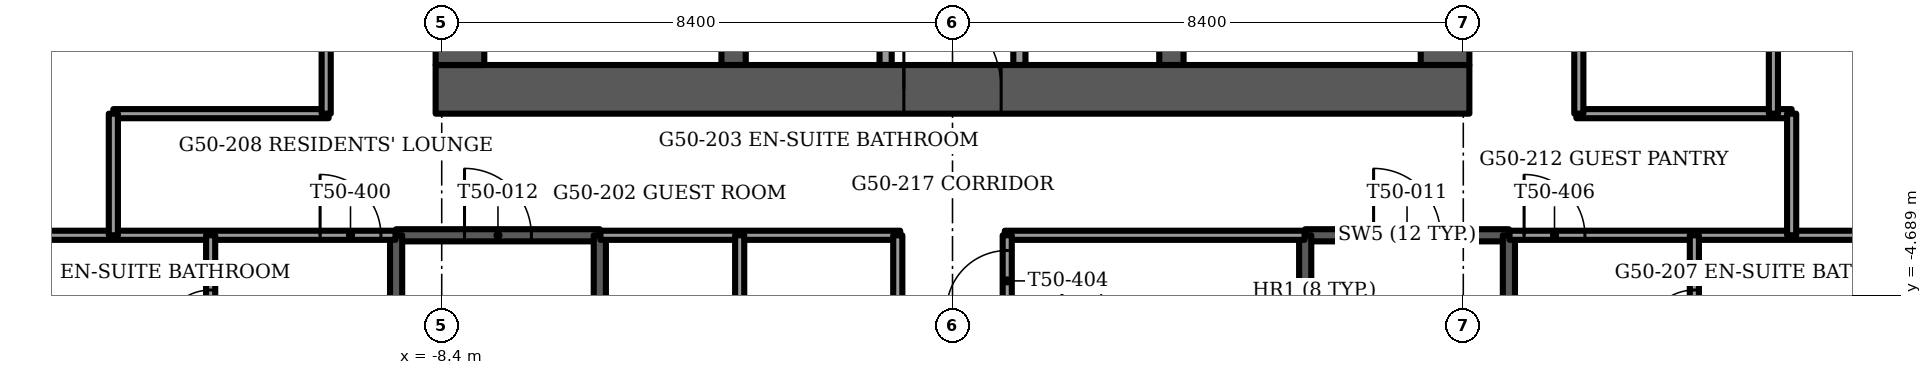
"""IFC4 building model, lengths in metres.
Left out: names, types, materials, properties, quantities, classifications, styles, units other than length and angle.
Written with IfcOpenShell. Run it as: python <this file> out.ifc"""

import sys

from ifc_helpers import new_model, si_unit, direction, frame, frame_2d, origin, place, context, subcontext, project, spatial, rectangle, extrude, element, fill, save


model = new_model("IFC4")
c1 = context("Model", 3, precision=1e-05, world=origin(), true_north=direction((0.0, 1.0)))
c2 = subcontext(c1, "Body", "Model", "MODEL_VIEW")
j1 = project(units=[si_unit("LENGTHUNIT", "METRE"), si_unit("PLANEANGLEUNIT", "RADIAN")], contexts=[c1])
p1 = place(None, origin())
s1 = spatial("IfcSite", under=j1, at=p1, CompositionType="ELEMENT")
p2 = place(p1, origin())
s2 = spatial("IfcBuilding", under=s1, at=p2, CompositionType="ELEMENT")
p3 = place(p2, frame((0.0, 0.0, 202.0)))
s3 = spatial("IfcBuildingStorey", under=s2, at=p3, CompositionType="ELEMENT", Elevation=202.0)
p4 = place(p3, frame((-8.5, -1.3, -0.3), z_axis=(0.0, 0.0, 1.0), x_axis=(1.0, 0.0, 0.0)))
e1 = element("IfcWall", 1, at=p4, inside=s3, PredefinedType="SHEAR", context=c2, shape_type="SweptSolid", body=[
    extrude(rectangle(XDim=17.0, YDim=0.8, at=frame_2d((8.5, 0.0))), origin(), (0.0, 0.0, 1.0), 3.75),
])
p5 = place(p4, frame((7.7, 0.0, 0.0)))
e2 = element("IfcOpeningElement", 2, at=p5, cuts=e1, PredefinedType="OPENING", context=c2, shape_type="SweptSolid", body=[
    extrude(rectangle(XDim=1.6, YDim=2.1, at=frame_2d((0.8, 1.05))), frame((0.0, 0.4, 0.0), z_axis=(0.0, -1.0, 0.0), x_axis=(1.0, 0.0, 0.0)), (0.0, 0.0, 1.0), 0.8),
])
p6 = place(p3, frame((-8.1, -0.9, -0.3), z_axis=(0.0, 0.0, 1.0), x_axis=(0.0, 1.0, 0.0)))
e3 = element("IfcWall", 3, at=p6, inside=s3, PredefinedType="SHEAR", context=c2, shape_type="SweptSolid", body=[
    extrude(rectangle(XDim=9.8, YDim=0.8, at=frame_2d((4.9, 0.0))), origin(), (0.0, 0.0, 1.0), 3.75),
])
p7 = place(p6, frame((8.15, 0.0, 0.0)))
e4 = element("IfcOpeningElement", 4, at=p7, cuts=e3, PredefinedType="OPENING", context=c2, shape_type="SweptSolid", body=[
    extrude(rectangle(XDim=1.1, YDim=2.1, at=frame_2d((0.55, 1.05))), frame((0.0, 0.4, 0.0), z_axis=(0.0, -1.0, 0.0), x_axis=(1.0, 0.0, 0.0)), (0.0, 0.0, 1.0), 0.8),
])
p8 = place(p3, frame((8.1, -0.9, -0.3), z_axis=(0.0, 0.0, 1.0), x_axis=(0.0, 1.0, 0.0)))
e5 = element("IfcWall", 5, at=p8, inside=s3, PredefinedType="SHEAR", context=c2, shape_type="SweptSolid", body=[
    extrude(rectangle(XDim=9.8, YDim=0.8, at=frame_2d((4.9, 0.0))), origin(), (0.0, 0.0, 1.0), 3.75),
])
p9 = place(p8, frame((8.15, 0.0, 0.0)))
e6 = element("IfcOpeningElement", 6, at=p9, cuts=e5, PredefinedType="OPENING", context=c2, shape_type="SweptSolid", body=[
    extrude(rectangle(XDim=1.1, YDim=2.1, at=frame_2d((0.55, 1.05))), frame((0.0, 0.4, 0.0), z_axis=(0.0, -1.0, 0.0), x_axis=(1.0, 0.0, 0.0)), (0.0, 0.0, 1.0), 0.8),
])
for number, where, z_axis, x_axis in (
    (7, (-3.6, -0.9, -0.3), (0.0, 0.0, 1.0), (0.0, 1.0, 0.0)),
    (8, (3.6, -0.9, -0.3), (0.0, 0.0, 1.0), (0.0, 1.0, 0.0)),
):
    element("IfcWall", number, at=place(p3, frame(where, z_axis=z_axis, x_axis=x_axis)), inside=s3, PredefinedType="SHEAR", context=c2, shape_type="SweptSolid", body=[
        extrude(rectangle(XDim=9.8, YDim=0.4, at=frame_2d((4.9, 0.0))), origin(), (0.0, 0.0, 1.0), 3.75),
    ])
p10 = place(p3, frame((-16.861, -1.645, 0.0), z_axis=(0.0, 0.0, 1.0), x_axis=(0.499993749393, -0.866029012544, 0.0)))
e9 = element("IfcWall", 9, at=p10, inside=s3, PredefinedType="SOLIDWALL", context=c2, shape_type="SweptSolid", body=[
    extrude(rectangle(XDim=10.075, YDim=0.15, at=frame_2d((5.038, 0.0))), origin(), (0.0, 0.0, 1.0), 3.45),
])
p11 = place(p10, frame((1.006, 0.0, 0.15)))
e10 = element("IfcOpeningElement", 10, at=p11, cuts=e9, PredefinedType="OPENING", context=c2, shape_type="SweptSolid", body=[
    extrude(rectangle(XDim=0.9, YDim=2.2, at=frame_2d((0.45, 1.1))), frame((0.0, 0.075, 0.0), z_axis=(0.0, -1.0, 0.0), x_axis=(1.0, 0.0, 0.0)), (0.0, 0.0, 1.0), 0.15),
])
p12 = place(p10, frame((3.206, 0.0, 0.15)))
e11 = element("IfcOpeningElement", 11, at=p12, cuts=e9, PredefinedType="OPENING", context=c2, shape_type="SweptSolid", body=[
    extrude(rectangle(XDim=1.4, YDim=2.2, at=frame_2d((0.7, 1.1))), frame((0.0, 0.075, 0.0), z_axis=(0.0, -1.0, 0.0), x_axis=(1.0, 0.0, 0.0)), (0.0, 0.0, 1.0), 0.15),
])
p13 = place(p10, frame((5.699, 0.0, 0.15)))
e12 = element("IfcOpeningElement", 12, at=p13, cuts=e9, PredefinedType="OPENING", context=c2, shape_type="SweptSolid", body=[
    extrude(rectangle(XDim=1.6, YDim=2.2, at=frame_2d((0.8, 1.1))), frame((0.0, 0.075, 0.0), z_axis=(0.0, -1.0, 0.0), x_axis=(1.0, 0.0, 0.0)), (0.0, 0.0, 1.0), 0.15),
])
p14 = place(p3, frame((11.824, -10.37, 0.0), z_axis=(0.0, 0.0, 1.0), x_axis=(0.499993749393, 0.866029012544, 0.0)))
e13 = element("IfcWall", 13, at=p14, inside=s3, PredefinedType="SOLIDWALL", context=c2, shape_type="SweptSolid", body=[
    extrude(rectangle(XDim=10.075, YDim=0.15, at=frame_2d((5.038, 0.0))), origin(), (0.0, 0.0, 1.0), 3.45),
])
p15 = place(p14, frame((1.269, 0.0, 0.15)))
e14 = element("IfcOpeningElement", 14, at=p15, cuts=e13, PredefinedType="OPENING", context=c2, shape_type="SweptSolid", body=[
    extrude(rectangle(XDim=1.6, YDim=2.2, at=frame_2d((0.8, 1.1))), frame((0.0, 0.075, 0.0), z_axis=(0.0, -1.0, 0.0), x_axis=(1.0, 0.0, 0.0)), (0.0, 0.0, 1.0), 0.15),
])
p16 = place(p14, frame((5.469, 0.0, 0.15)))
e15 = element("IfcOpeningElement", 15, at=p16, cuts=e13, PredefinedType="OPENING", context=c2, shape_type="SweptSolid", body=[
    extrude(rectangle(XDim=1.6, YDim=2.2, at=frame_2d((0.8, 1.1))), frame((0.0, 0.075, 0.0), z_axis=(0.0, -1.0, 0.0), x_axis=(1.0, 0.0, 0.0)), (0.0, 0.0, 1.0), 0.15),
])
for number, where, z_axis, x_axis in (
    (16, (-1.1, -0.9, 0.0), (0.0, 0.0, 1.0), (0.0, 1.0, 0.0)),
    (17, (1.1, -0.9, 0.0), (0.0, 0.0, 1.0), (0.0, 1.0, 0.0)),
):
    element("IfcWall", number, at=place(p3, frame(where, z_axis=z_axis, x_axis=x_axis)), inside=s3, PredefinedType="PARTITIONING", context=c2, shape_type="SweptSolid", body=[
        extrude(rectangle(XDim=2.9, YDim=0.2, at=frame_2d((1.45, 0.0))), origin(), (0.0, 0.0, 1.0), 3.45),
    ])
p17 = place(p3, frame((5.8, -3.7, -0.3), z_axis=(0.0, 0.0, 1.0), x_axis=(1.0, 0.0, 0.0)))
e18 = element("IfcWall", 18, at=p17, inside=s3, PredefinedType="SOLIDWALL", context=c2, shape_type="SweptSolid", body=[
    extrude(rectangle(XDim=3.35, YDim=0.2, at=frame_2d((1.675, 0.0))), origin(), (0.0, 0.0, 1.0), 3.75),
])
p18 = place(p17, frame((1.125, 0.0, 0.0)))
e19 = element("IfcOpeningElement", 19, at=p18, cuts=e18, PredefinedType="OPENING", context=c2, shape_type="SweptSolid", body=[
    extrude(rectangle(XDim=1.1, YDim=2.1, at=frame_2d((0.55, 1.05))), frame((0.0, 0.1, 0.0), z_axis=(0.0, -1.0, 0.0), x_axis=(1.0, 0.0, 0.0)), (0.0, 0.0, 1.0), 0.2),
])
for number, where, z_axis, x_axis in (
    (20, (5.8, -3.7, -0.3), (0.0, 0.0, 1.0), (0.0, -1.0, 0.0)),
    (21, (9.15, -3.7, -0.3), (0.0, 0.0, 1.0), (0.0, -1.0, 0.0)),
):
    element("IfcWall", number, at=place(p3, frame(where, z_axis=z_axis, x_axis=x_axis)), inside=s3, PredefinedType="SOLIDWALL", context=c2, shape_type="SweptSolid", body=[
        extrude(rectangle(XDim=7.7, YDim=0.2, at=frame_2d((3.85, 0.0))), origin(), (0.0, 0.0, 1.0), 3.75),
    ])
p19 = place(p3, frame((-9.15, -3.7, -0.3), z_axis=(0.0, 0.0, 1.0), x_axis=(1.0, 0.0, 0.0)))
e22 = element("IfcWall", 22, at=p19, inside=s3, PredefinedType="SOLIDWALL", context=c2, shape_type="SweptSolid", body=[
    extrude(rectangle(XDim=3.35, YDim=0.2, at=frame_2d((1.675, 0.0))), origin(), (0.0, 0.0, 1.0), 3.75),
])
p20 = place(p19, frame((1.125, 0.0, 0.0)))
e23 = element("IfcOpeningElement", 23, at=p20, cuts=e22, PredefinedType="OPENING", context=c2, shape_type="SweptSolid", body=[
    extrude(rectangle(XDim=1.1, YDim=2.1, at=frame_2d((0.55, 1.05))), frame((0.0, 0.1, 0.0), z_axis=(0.0, -1.0, 0.0), x_axis=(1.0, 0.0, 0.0)), (0.0, 0.0, 1.0), 0.2),
])
for number, where, z_axis, x_axis in (
    (24, (-9.15, -3.7, -0.3), (0.0, 0.0, 1.0), (0.0, -1.0, 0.0)),
    (25, (-5.8, -3.7, -0.3), (0.0, 0.0, 1.0), (0.0, -1.0, 0.0)),
):
    element("IfcWall", number, at=place(p3, frame(where, z_axis=z_axis, x_axis=x_axis)), inside=s3, PredefinedType="SOLIDWALL", context=c2, shape_type="SweptSolid", body=[
        extrude(rectangle(XDim=7.7, YDim=0.2, at=frame_2d((3.85, 0.0))), origin(), (0.0, 0.0, 1.0), 3.75),
    ])
p21 = place(p3, frame((-15.727, -3.7, 0.0), z_axis=(0.0, 0.0, 1.0), x_axis=(1.0, 0.0, 0.0)))
e26 = element("IfcWall", 26, at=p21, inside=s3, PredefinedType="PARTITIONING", context=c2, shape_type="SweptSolid", body=[
    extrude(rectangle(XDim=6.567, YDim=0.15, at=frame_2d((3.284, 0.0))), origin(), (0.0, 0.0, 1.0), 3.45),
])
p22 = place(p21, frame((5.327, 0.0, 0.0)))
e27 = element("IfcOpeningElement", 27, at=p22, cuts=e26, PredefinedType="OPENING", context=c2, shape_type="SweptSolid", body=[
    extrude(rectangle(XDim=1.0, YDim=2.1, at=frame_2d((0.5, 1.05))), frame((0.0, 0.075, 0.0), z_axis=(0.0, -1.0, 0.0), x_axis=(1.0, 0.0, 0.0)), (0.0, 0.0, 1.0), 0.15),
])
for number, where, z_axis, x_axis in (
    (28, (-5.79, -3.7, 0.0), (0.0, 0.0, 1.0), (1.0, 0.0, 0.0)),
    (29, (0.86, -3.7, 0.0), (0.0, 0.0, 1.0), (1.0, 0.0, 0.0)),
):
    element("IfcWall", number, at=place(p3, frame(where, z_axis=z_axis, x_axis=x_axis)), inside=s3, PredefinedType="PARTITIONING", context=c2, shape_type="SweptSolid", body=[
        extrude(rectangle(XDim=4.93, YDim=0.15, at=frame_2d((2.465, 0.0))), origin(), (0.0, 0.0, 1.0), 3.45),
    ])
p23 = place(p3, frame((9.16, -3.7, 0.0), z_axis=(0.0, 0.0, 1.0), x_axis=(1.0, 0.0, 0.0)))
e30 = element("IfcWall", 30, at=p23, inside=s3, PredefinedType="PARTITIONING", context=c2, shape_type="SweptSolid", body=[
    extrude(rectangle(XDim=6.567, YDim=0.15, at=frame_2d((3.284, 0.0))), origin(), (0.0, 0.0, 1.0), 3.45),
])
p24 = place(p23, frame((0.24, 0.0, 0.0)))
e31 = element("IfcOpeningElement", 31, at=p24, cuts=e30, PredefinedType="OPENING", context=c2, shape_type="SweptSolid", body=[
    extrude(rectangle(XDim=1.0, YDim=2.1, at=frame_2d((0.5, 1.05))), frame((0.0, 0.075, 0.0), z_axis=(0.0, -1.0, 0.0), x_axis=(1.0, 0.0, 0.0)), (0.0, 0.0, 1.0), 0.15),
])
for number, where, z_axis, x_axis in (
    (32, (-13.8, -1.7, 0.0), (0.0, 0.0, 1.0), (1.0, 0.0, 0.0)),
    (33, (10.26, -1.7, 0.0), (0.0, 0.0, 1.0), (1.0, 0.0, 0.0)),
):
    element("IfcWall", number, at=place(p3, frame(where, z_axis=z_axis, x_axis=x_axis)), inside=s3, PredefinedType="PARTITIONING", context=c2, shape_type="SweptSolid", body=[
        extrude(rectangle(XDim=3.54, YDim=0.15, at=frame_2d((1.77, 0.0))), origin(), (0.0, 0.0, 1.0), 3.45),
    ])
p25 = place(p3, frame((13.8, -3.7, 0.0), z_axis=(0.0, 0.0, 1.0), x_axis=(0.0, 1.0, 0.0)))
e34 = element("IfcWall", 34, at=p25, inside=s3, PredefinedType="PARTITIONING", context=c2, shape_type="SweptSolid", body=[
    extrude(rectangle(XDim=2.0, YDim=0.15, at=frame_2d((1.0, 0.0))), origin(), (0.0, 0.0, 1.0), 3.45),
])
p26 = place(p3, frame((13.5, -1.7, 0.0), z_axis=(0.0, 0.0, 1.0), x_axis=(0.0, 1.0, 0.0)))
e35 = element("IfcWall", 35, at=p26, inside=s3, PredefinedType="PARTITIONING", context=c2, shape_type="SweptSolid", body=[
    extrude(rectangle(XDim=2.6, YDim=0.15, at=frame_2d((1.3, 0.0))), origin(), (0.0, 0.0, 1.0), 3.45),
])
p27 = place(p3, frame((12.2, -6.3, 0.0), z_axis=(0.0, 0.0, 1.0), x_axis=(0.0, 1.0, 0.0)))
e36 = element("IfcWall", 36, at=p27, inside=s3, PredefinedType="PARTITIONING", context=c2, shape_type="SweptSolid", body=[
    extrude(rectangle(XDim=2.6, YDim=0.15, at=frame_2d((1.3, 0.0))), origin(), (0.0, 0.0, 1.0), 3.45),
])
p28 = place(p27, frame((0.9, 0.0, 0.0)))
e37 = element("IfcOpeningElement", 37, at=p28, cuts=e36, PredefinedType="OPENING", context=c2, shape_type="SweptSolid", body=[
    extrude(rectangle(XDim=0.8, YDim=2.1, at=frame_2d((0.4, 1.05))), frame((0.0, 0.075, 0.0), z_axis=(0.0, -1.0, 0.0), x_axis=(1.0, 0.0, 0.0)), (0.0, 0.0, 1.0), 0.15),
])
p29 = place(p3, frame((10.3, -1.7, 0.0), z_axis=(0.0, 0.0, 1.0), x_axis=(0.0, 1.0, 0.0)))
e38 = element("IfcWall", 38, at=p29, inside=s3, PredefinedType="PARTITIONING", context=c2, shape_type="SweptSolid", body=[
    extrude(rectangle(XDim=8.1, YDim=0.15, at=frame_2d((4.05, 0.0))), origin(), (0.0, 0.0, 1.0), 3.45),
])
p30 = place(p29, frame((3.66, 0.0, 0.0)))
e39 = element("IfcOpeningElement", 39, at=p30, cuts=e38, PredefinedType="OPENING", context=c2, shape_type="SweptSolid", body=[
    extrude(rectangle(XDim=1.0, YDim=2.1, at=frame_2d((0.5, 1.05))), frame((0.0, 0.075, 0.0), z_axis=(0.0, -1.0, 0.0), x_axis=(1.0, 0.0, 0.0)), (0.0, 0.0, 1.0), 0.15),
])
p31 = place(p29, frame((6.75, 0.0, 0.0)))
e40 = element("IfcOpeningElement", 40, at=p31, cuts=e38, PredefinedType="OPENING", context=c2, shape_type="SweptSolid", body=[
    extrude(rectangle(XDim=1.0, YDim=2.1, at=frame_2d((0.5, 1.05))), frame((0.0, 0.075, 0.0), z_axis=(0.0, -1.0, 0.0), x_axis=(1.0, 0.0, 0.0)), (0.0, 0.0, 1.0), 0.15),
])
p32 = place(p3, frame((0.9, -8.535, 0.0), z_axis=(0.0, 0.0, 1.0), x_axis=(0.0, 1.0, 0.0)))
e41 = element("IfcWall", 41, at=p32, inside=s3, PredefinedType="PARTITIONING", context=c2, shape_type="SweptSolid", body=[
    extrude(rectangle(XDim=4.835, YDim=0.15, at=frame_2d((2.417, 0.0))), origin(), (0.0, 0.0, 1.0), 3.45),
])
p33 = place(p32, frame((3.585, 0.0, 0.0)))
e42 = element("IfcOpeningElement", 42, at=p33, cuts=e41, PredefinedType="OPENING", context=c2, shape_type="SweptSolid", body=[
    extrude(rectangle(XDim=1.0, YDim=2.1, at=frame_2d((0.5, 1.05))), frame((0.0, 0.075, 0.0), z_axis=(0.0, -1.0, 0.0), x_axis=(1.0, 0.0, 0.0)), (0.0, 0.0, 1.0), 0.15),
])
p34 = place(p3, frame((-0.9, -8.535, 0.0), z_axis=(0.0, 0.0, 1.0), x_axis=(0.0, 1.0, 0.0)))
e43 = element("IfcWall", 43, at=p34, inside=s3, PredefinedType="PARTITIONING", context=c2, shape_type="SweptSolid", body=[
    extrude(rectangle(XDim=4.835, YDim=0.15, at=frame_2d((2.417, 0.0))), origin(), (0.0, 0.0, 1.0), 3.45),
])
p35 = place(p34, frame((0.25, 0.0, 0.0)))
e44 = element("IfcOpeningElement", 44, at=p35, cuts=e43, PredefinedType="OPENING", context=c2, shape_type="SweptSolid", body=[
    extrude(rectangle(XDim=1.0, YDim=2.1, at=frame_2d((0.5, 1.05))), frame((0.0, 0.075, 0.0), z_axis=(0.0, -1.0, 0.0), x_axis=(1.0, 0.0, 0.0)), (0.0, 0.0, 1.0), 0.15),
])
p36 = place(p3, frame((-3.5, -7.1, 0.0), z_axis=(0.0, 0.0, 1.0), x_axis=(0.0, 1.0, 0.0)))
e45 = element("IfcWall", 45, at=p36, inside=s3, PredefinedType="PARTITIONING", context=c2, shape_type="SweptSolid", body=[
    extrude(rectangle(XDim=3.4, YDim=0.15, at=frame_2d((1.7, 0.0))), origin(), (0.0, 0.0, 1.0), 3.45),
])
p37 = place(p3, frame((-10.3, -1.7, 0.0), z_axis=(0.0, 0.0, 1.0), x_axis=(0.0, 1.0, 0.0)))
e46 = element("IfcWall", 46, at=p37, inside=s3, PredefinedType="PARTITIONING", context=c2, shape_type="SweptSolid", body=[
    extrude(rectangle(XDim=8.1, YDim=0.15, at=frame_2d((4.05, 0.0))), origin(), (0.0, 0.0, 1.0), 3.45),
])
p38 = place(p37, frame((1.74, 0.0, 0.0)))
e47 = element("IfcOpeningElement", 47, at=p38, cuts=e46, PredefinedType="OPENING", context=c2, shape_type="SweptSolid", body=[
    extrude(rectangle(XDim=1.0, YDim=2.1, at=frame_2d((0.5, 1.05))), frame((0.0, 0.075, 0.0), z_axis=(0.0, -1.0, 0.0), x_axis=(1.0, 0.0, 0.0)), (0.0, 0.0, 1.0), 0.15),
])
p39 = place(p37, frame((6.75, 0.0, 0.0)))
e48 = element("IfcOpeningElement", 48, at=p39, cuts=e46, PredefinedType="OPENING", context=c2, shape_type="SweptSolid", body=[
    extrude(rectangle(XDim=1.0, YDim=2.1, at=frame_2d((0.5, 1.05))), frame((0.0, 0.075, 0.0), z_axis=(0.0, -1.0, 0.0), x_axis=(1.0, 0.0, 0.0)), (0.0, 0.0, 1.0), 0.15),
])
p40 = place(p3, frame((-12.2, -6.3, 0.0), z_axis=(0.0, 0.0, 1.0), x_axis=(0.0, 1.0, 0.0)))
e49 = element("IfcWall", 49, at=p40, inside=s3, PredefinedType="PARTITIONING", context=c2, shape_type="SweptSolid", body=[
    extrude(rectangle(XDim=2.6, YDim=0.15, at=frame_2d((1.3, 0.0))), origin(), (0.0, 0.0, 1.0), 3.45),
])
p41 = place(p40, frame((0.9, 0.0, 0.0)))
e50 = element("IfcOpeningElement", 50, at=p41, cuts=e49, PredefinedType="OPENING", context=c2, shape_type="SweptSolid", body=[
    extrude(rectangle(XDim=0.8, YDim=2.1, at=frame_2d((0.4, 1.05))), frame((0.0, 0.075, 0.0), z_axis=(0.0, -1.0, 0.0), x_axis=(1.0, 0.0, 0.0)), (0.0, 0.0, 1.0), 0.15),
])
p42 = place(p3, frame((-13.8, -3.7, 0.0), z_axis=(0.0, 0.0, 1.0), x_axis=(0.0, 1.0, 0.0)))
e51 = element("IfcWall", 51, at=p42, inside=s3, PredefinedType="PARTITIONING", context=c2, shape_type="SweptSolid", body=[
    extrude(rectangle(XDim=2.0, YDim=0.15, at=frame_2d((1.0, 0.0))), origin(), (0.0, 0.0, 1.0), 3.45),
])
p43 = place(p12, origin())
e52 = element("IfcWindow", 52, at=p43, inside=s3, PartitioningType="SINGLE_PANEL", PredefinedType="WINDOW", context=c2, shape_type="SweptSolid", body=[
    extrude(rectangle(XDim=1.4, YDim=2.2, at=frame_2d((0.7, 1.1))), frame((0.0, 0.03, 0.0), z_axis=(0.0, -1.0, 0.0), x_axis=(1.0, 0.0, 0.0)), (0.0, 0.0, 1.0), 0.06),
])
fill(e11, e52)
p44 = place(p16, origin())
e53 = element("IfcWindow", 53, at=p44, inside=s3, PartitioningType="SINGLE_PANEL", PredefinedType="WINDOW", context=c2, shape_type="SweptSolid", body=[
    extrude(rectangle(XDim=1.6, YDim=2.2, at=frame_2d((0.8, 1.1))), frame((0.0, 0.03, 0.0), z_axis=(0.0, -1.0, 0.0), x_axis=(1.0, 0.0, 0.0)), (0.0, 0.0, 1.0), 0.06),
])
fill(e15, e53)
p45 = place(p5, origin())
e54 = element("IfcDoor", 54, at=p45, inside=s3, OperationType="DOUBLE_DOOR_SINGLE_SWING", PredefinedType="DOOR", context=c2, shape_type="SweptSolid", body=[
    extrude(rectangle(XDim=1.6, YDim=2.1, at=frame_2d((0.8, 1.05))), frame((0.0, 0.025, 0.0), z_axis=(0.0, -1.0, 0.0), x_axis=(1.0, 0.0, 0.0)), (0.0, 0.0, 1.0), 0.05),
])
fill(e2, e54)
p46 = place(p18, origin())
e55 = element("IfcDoor", 55, at=p46, inside=s3, OperationType="SINGLE_SWING_LEFT", PredefinedType="DOOR", context=c2, shape_type="SweptSolid", body=[
    extrude(rectangle(XDim=1.1, YDim=2.1, at=frame_2d((0.55, 1.05))), frame((0.0, 0.025, 0.0), z_axis=(0.0, -1.0, 0.0), x_axis=(1.0, 0.0, 0.0)), (0.0, 0.0, 1.0), 0.05),
])
fill(e19, e55)
p47 = place(p20, origin())
e56 = element("IfcDoor", 56, at=p47, inside=s3, OperationType="SINGLE_SWING_LEFT", PredefinedType="DOOR", context=c2, shape_type="SweptSolid", body=[
    extrude(rectangle(XDim=1.1, YDim=2.1, at=frame_2d((0.55, 1.05))), frame((0.0, 0.025, 0.0), z_axis=(0.0, -1.0, 0.0), x_axis=(1.0, 0.0, 0.0)), (0.0, 0.0, 1.0), 0.05),
])
fill(e23, e56)
p48 = place(p22, origin())
e57 = element("IfcDoor", 57, at=p48, inside=s3, OperationType="SINGLE_SWING_RIGHT", PredefinedType="DOOR", context=c2, shape_type="SweptSolid", body=[
    extrude(rectangle(XDim=1.0, YDim=2.1, at=frame_2d((0.5, 1.05))), frame((0.0, 0.025, 0.0), z_axis=(0.0, -1.0, 0.0), x_axis=(1.0, 0.0, 0.0)), (0.0, 0.0, 1.0), 0.05),
])
fill(e27, e57)
p49 = place(p41, origin())
e58 = element("IfcDoor", 58, at=p49, inside=s3, OperationType="SINGLE_SWING_RIGHT", PredefinedType="DOOR", context=c2, shape_type="SweptSolid", body=[
    extrude(rectangle(XDim=0.8, YDim=2.1, at=frame_2d((0.4, 1.05))), frame((0.0, 0.025, 0.0), z_axis=(0.0, -1.0, 0.0), x_axis=(1.0, 0.0, 0.0)), (0.0, 0.0, 1.0), 0.05),
])
fill(e50, e58)
p50 = place(p33, origin())
e59 = element("IfcDoor", 59, at=p50, inside=s3, OperationType="SINGLE_SWING_RIGHT", PredefinedType="DOOR", context=c2, shape_type="SweptSolid", body=[
    extrude(rectangle(XDim=1.0, YDim=2.1, at=frame_2d((0.5, 1.05))), frame((0.0, 0.025, 0.0), z_axis=(0.0, -1.0, 0.0), x_axis=(1.0, 0.0, 0.0)), (0.0, 0.0, 1.0), 0.05),
])
fill(e42, e59)
p51 = place(p24, origin())
e60 = element("IfcDoor", 60, at=p51, inside=s3, OperationType="SINGLE_SWING_LEFT", PredefinedType="DOOR", context=c2, shape_type="SweptSolid", body=[
    extrude(rectangle(XDim=1.0, YDim=2.1, at=frame_2d((0.5, 1.05))), frame((0.0, 0.025, 0.0), z_axis=(0.0, -1.0, 0.0), x_axis=(1.0, 0.0, 0.0)), (0.0, 0.0, 1.0), 0.05),
])
fill(e31, e60)
p52 = place(p28, origin())
e61 = element("IfcDoor", 61, at=p52, inside=s3, OperationType="SINGLE_SWING_RIGHT", PredefinedType="DOOR", context=c2, shape_type="SweptSolid", body=[
    extrude(rectangle(XDim=0.8, YDim=2.1, at=frame_2d((0.4, 1.05))), frame((0.0, 0.025, 0.0), z_axis=(0.0, -1.0, 0.0), x_axis=(1.0, 0.0, 0.0)), (0.0, 0.0, 1.0), 0.05),
])
fill(e37, e61)
save(model, sys.argv[1])
